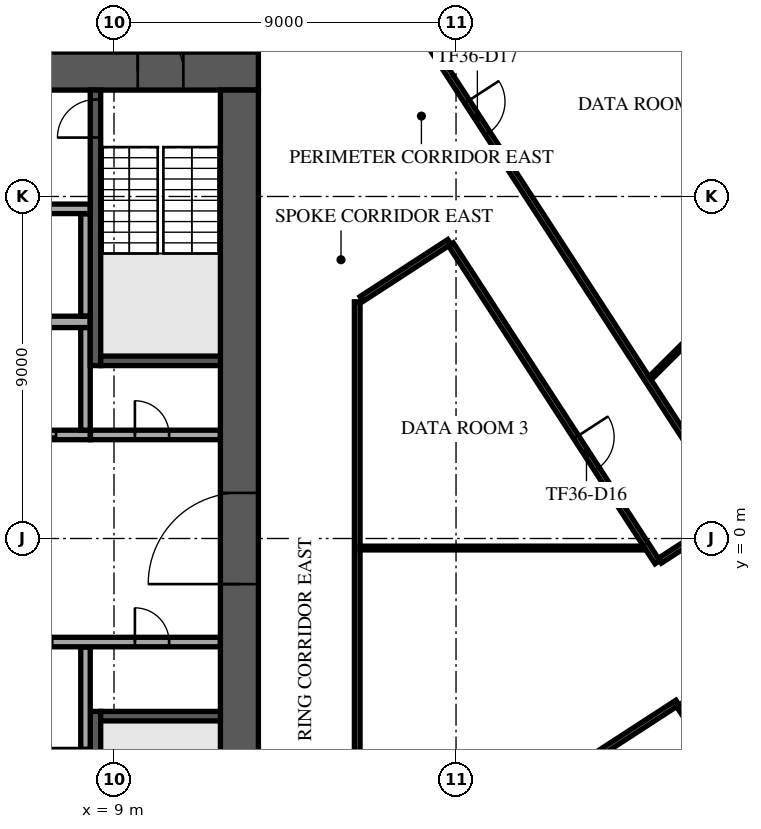
"""IFC4 building model, lengths in metres.
Left out: names, types, materials, properties, quantities, classifications, styles, units other than length and angle.
Written with IfcOpenShell. Run it as: python <this file> out.ifc"""

import sys

from ifc_helpers import new_model, si_unit, direction, frame, frame_2d, origin, place, context, subcontext, project, spatial, rectangle, extrude, element, fill, save


model = new_model("IFC4")
c1 = context("Model", 3, precision=1e-05, world=origin(), true_north=direction((0.0, 1.0)))
c2 = subcontext(c1, "Body", "Model", "MODEL_VIEW")
j1 = project(units=[si_unit("LENGTHUNIT", "METRE"), si_unit("PLANEANGLEUNIT", "RADIAN")], contexts=[c1])
p1 = place(None, origin())
s1 = spatial("IfcSite", under=j1, at=p1, CompositionType="ELEMENT")
p2 = place(p1, origin())
s2 = spatial("IfcBuilding", under=s1, at=p2, CompositionType="ELEMENT")
p3 = place(p2, frame((0.0, 0.0, 155.7)))
s3 = spatial("IfcBuildingStorey", under=s2, at=p3, CompositionType="ELEMENT", Elevation=155.7)
p4 = place(p3, frame((-12.8, 12.3, 0.0), z_axis=(0.0, 0.0, 1.0), x_axis=(1.0, 0.0, 0.0)))
e1 = element("IfcWall", 1, at=p4, inside=s3, PredefinedType="SHEAR", context=c2, shape_type="SweptSolid", body=[
    extrude(rectangle(XDim=25.6, YDim=1.0, at=frame_2d((12.8, 0.0))), origin(), (0.0, 0.0, 1.0), 3.6),
])
p5 = place(p4, frame((11.6, 0.0, 0.0)))
e2 = element("IfcOpeningElement", 2, at=p5, cuts=e1, PredefinedType="OPENING", context=c2, shape_type="SweptSolid", body=[
    extrude(rectangle(XDim=2.4, YDim=2.4, at=frame_2d((1.2, 1.2))), frame((0.0, 0.51, 0.0), z_axis=(0.0, -1.0, 0.0), x_axis=(1.0, 0.0, 0.0)), (0.0, 0.0, 1.0), 1.02),
])
p6 = place(p4, frame((22.425, 0.0, 0.0)))
e3 = element("IfcOpeningElement", 3, at=p6, cuts=e1, PredefinedType="OPENING", context=c2, shape_type="SweptSolid", body=[
    extrude(rectangle(XDim=1.2, YDim=2.1, at=frame_2d((0.6, 1.05))), frame((0.0, 0.51, 0.0), z_axis=(0.0, -1.0, 0.0), x_axis=(1.0, 0.0, 0.0)), (0.0, 0.0, 1.0), 1.02),
])
p7 = place(p4, frame((1.4, 0.0, 0.0)))
e4 = element("IfcOpeningElement", 4, at=p7, cuts=e1, PredefinedType="OPENING", context=c2, shape_type="SweptSolid", body=[
    extrude(rectangle(XDim=1.0, YDim=2.1, at=frame_2d((0.5, 1.05))), frame((0.0, 0.51, 0.0), z_axis=(0.0, -1.0, 0.0), x_axis=(1.0, 0.0, 0.0)), (0.0, 0.0, 1.0), 1.02),
])
p8 = place(p3, frame((12.3, -11.8, 0.0), z_axis=(0.0, 0.0, 1.0), x_axis=(0.0, 1.0, 0.0)))
e5 = element("IfcWall", 5, at=p8, inside=s3, PredefinedType="SHEAR", context=c2, shape_type="SweptSolid", body=[
    extrude(rectangle(XDim=23.6, YDim=1.0, at=frame_2d((11.8, 0.0))), origin(), (0.0, 0.0, 1.0), 3.6),
])
p9 = place(p8, frame((10.6, 0.0, 0.0)))
e6 = element("IfcOpeningElement", 6, at=p9, cuts=e5, PredefinedType="OPENING", context=c2, shape_type="SweptSolid", body=[
    extrude(rectangle(XDim=2.4, YDim=2.4, at=frame_2d((1.2, 1.2))), frame((0.0, 0.51, 0.0), z_axis=(0.0, -1.0, 0.0), x_axis=(1.0, 0.0, 0.0)), (0.0, 0.0, 1.0), 1.02),
])
p10 = place(p3, frame((-8.375, 5.7, 0.0), z_axis=(0.0, 0.0, 1.0), x_axis=(1.0, 0.0, 0.0)))
e7 = element("IfcWall", 7, at=p10, inside=s3, PredefinedType="SOLIDWALL", context=c2, shape_type="SweptSolid", body=[
    extrude(rectangle(XDim=16.75, YDim=0.3, at=frame_2d((8.375, 0.0))), origin(), (0.0, 0.0, 1.0), 3.6),
])
p11 = place(p3, frame((-2.875, -5.7, 0.0), z_axis=(0.0, 0.0, 1.0), x_axis=(1.0, 0.0, 0.0)))
e8 = element("IfcWall", 8, at=p11, inside=s3, PredefinedType="SOLIDWALL", context=c2, shape_type="SweptSolid", body=[
    extrude(rectangle(XDim=11.25, YDim=0.3, at=frame_2d((5.625, 0.0))), origin(), (0.0, 0.0, 1.0), 3.6),
])
p12 = place(p3, frame((-8.375, 2.725, 0.0), z_axis=(0.0, 0.0, 1.0), x_axis=(1.0, 0.0, 0.0)))
e9 = element("IfcWall", 9, at=p12, inside=s3, PredefinedType="SOLIDWALL", context=c2, shape_type="SweptSolid", body=[
    extrude(rectangle(XDim=16.75, YDim=0.25, at=frame_2d((8.375, 0.0))), origin(), (0.0, 0.0, 1.0), 3.6),
])
p13 = place(p12, frame((0.9, 0.0, 0.0)))
e10 = element("IfcOpeningElement", 10, at=p13, cuts=e9, PredefinedType="OPENING", context=c2, shape_type="SweptSolid", body=[
    extrude(rectangle(XDim=1.2, YDim=2.1, at=frame_2d((0.6, 1.05))), frame((0.0, 0.135, 0.0), z_axis=(0.0, -1.0, 0.0), x_axis=(1.0, 0.0, 0.0)), (0.0, 0.0, 1.0), 0.27),
])
p14 = place(p12, frame((3.65, 0.0, 0.0)))
e11 = element("IfcOpeningElement", 11, at=p14, cuts=e9, PredefinedType="OPENING", context=c2, shape_type="SweptSolid", body=[
    extrude(rectangle(XDim=1.2, YDim=2.1, at=frame_2d((0.6, 1.05))), frame((0.0, 0.135, 0.0), z_axis=(0.0, -1.0, 0.0), x_axis=(1.0, 0.0, 0.0)), (0.0, 0.0, 1.0), 0.27),
])
p15 = place(p12, frame((6.4, 0.0, 0.0)))
e12 = element("IfcOpeningElement", 12, at=p15, cuts=e9, PredefinedType="OPENING", context=c2, shape_type="SweptSolid", body=[
    extrude(rectangle(XDim=1.2, YDim=2.1, at=frame_2d((0.6, 1.05))), frame((0.0, 0.135, 0.0), z_axis=(0.0, -1.0, 0.0), x_axis=(1.0, 0.0, 0.0)), (0.0, 0.0, 1.0), 0.27),
])
p16 = place(p12, frame((9.15, 0.0, 0.0)))
e13 = element("IfcOpeningElement", 13, at=p16, cuts=e9, PredefinedType="OPENING", context=c2, shape_type="SweptSolid", body=[
    extrude(rectangle(XDim=1.2, YDim=2.1, at=frame_2d((0.6, 1.05))), frame((0.0, 0.135, 0.0), z_axis=(0.0, -1.0, 0.0), x_axis=(1.0, 0.0, 0.0)), (0.0, 0.0, 1.0), 0.27),
])
p17 = place(p12, frame((11.9, 0.0, 0.0)))
e14 = element("IfcOpeningElement", 14, at=p17, cuts=e9, PredefinedType="OPENING", context=c2, shape_type="SweptSolid", body=[
    extrude(rectangle(XDim=1.2, YDim=2.1, at=frame_2d((0.6, 1.05))), frame((0.0, 0.135, 0.0), z_axis=(0.0, -1.0, 0.0), x_axis=(1.0, 0.0, 0.0)), (0.0, 0.0, 1.0), 0.27),
])
p18 = place(p12, frame((14.65, 0.0, 0.0)))
e15 = element("IfcOpeningElement", 15, at=p18, cuts=e9, PredefinedType="OPENING", context=c2, shape_type="SweptSolid", body=[
    extrude(rectangle(XDim=1.2, YDim=2.1, at=frame_2d((0.6, 1.05))), frame((0.0, 0.135, 0.0), z_axis=(0.0, -1.0, 0.0), x_axis=(1.0, 0.0, 0.0)), (0.0, 0.0, 1.0), 0.27),
])
p19 = place(p3, frame((8.25, 2.85, 0.0), z_axis=(0.0, 0.0, 1.0), x_axis=(0.0, 1.0, 0.0)))
e16 = element("IfcWall", 16, at=p19, inside=s3, PredefinedType="SOLIDWALL", context=c2, shape_type="SweptSolid", body=[
    extrude(rectangle(XDim=2.7, YDim=0.25, at=frame_2d((1.35, 0.0))), origin(), (0.0, 0.0, 1.0), 3.6),
])
p20 = place(p3, frame((8.512, 4.55, 0.0), z_axis=(0.0, 0.0, 1.0), x_axis=(0.0, 1.0, 0.0)))
e17 = element("IfcWall", 17, at=p20, inside=s3, PredefinedType="SOLIDWALL", context=c2, shape_type="SweptSolid", body=[
    extrude(rectangle(XDim=7.25, YDim=0.275, at=frame_2d((3.625, 0.0))), origin(), (0.0, 0.0, 1.0), 3.6),
])
p21 = place(p20, frame((6.0, 0.0, 0.0)))
e18 = element("IfcOpeningElement", 18, at=p21, cuts=e17, PredefinedType="OPENING", context=c2, shape_type="SweptSolid", body=[
    extrude(rectangle(XDim=1.0, YDim=2.1, at=frame_2d((0.5, 1.05))), frame((0.0, 0.147, 0.0), z_axis=(0.0, -1.0, 0.0), x_axis=(1.0, 0.0, 0.0)), (0.0, 0.0, 1.0), 0.295),
])
p22 = place(p3, frame((8.65, 4.675, 0.0), z_axis=(0.0, 0.0, 1.0), x_axis=(1.0, 0.0, 0.0)))
e19 = element("IfcWall", 19, at=p22, inside=s3, PredefinedType="SOLIDWALL", context=c2, shape_type="SweptSolid", body=[
    extrude(rectangle(XDim=3.15, YDim=0.25, at=frame_2d((1.575, 0.0))), origin(), (0.0, 0.0, 1.0), 3.6),
])
p23 = place(p3, frame((8.512, -4.55, 0.0), z_axis=(0.0, 0.0, 1.0), x_axis=(0.0, -1.0, 0.0)))
e20 = element("IfcWall", 20, at=p23, inside=s3, PredefinedType="SOLIDWALL", context=c2, shape_type="SweptSolid", body=[
    extrude(rectangle(XDim=7.25, YDim=0.275, at=frame_2d((3.625, 0.0))), origin(), (0.0, 0.0, 1.0), 3.6),
])
p24 = place(p23, frame((6.0, 0.0, 0.0)))
e21 = element("IfcOpeningElement", 21, at=p24, cuts=e20, PredefinedType="OPENING", context=c2, shape_type="SweptSolid", body=[
    extrude(rectangle(XDim=1.0, YDim=2.1, at=frame_2d((0.5, 1.05))), frame((0.0, 0.147, 0.0), z_axis=(0.0, -1.0, 0.0), x_axis=(1.0, 0.0, 0.0)), (0.0, 0.0, 1.0), 0.295),
])
p25 = place(p3, frame((8.65, -4.675, 0.0), z_axis=(0.0, 0.0, 1.0), x_axis=(1.0, 0.0, 0.0)))
e22 = element("IfcWall", 22, at=p25, inside=s3, PredefinedType="SOLIDWALL", context=c2, shape_type="SweptSolid", body=[
    extrude(rectangle(XDim=3.15, YDim=0.25, at=frame_2d((1.575, 0.0))), origin(), (0.0, 0.0, 1.0), 3.6),
])
p26 = place(p3, frame((8.25, -5.545, 0.0), z_axis=(0.0, 0.0, 1.0), x_axis=(0.0, 1.0, 0.0)))
e23 = element("IfcWall", 23, at=p26, inside=s3, PredefinedType="PARTITIONING", context=c2, shape_type="SweptSolid", body=[
    extrude(rectangle(XDim=2.69, YDim=0.25, at=frame_2d((1.345, 0.0))), origin(), (0.0, 0.0, 1.0), 3.6),
])
p27 = place(p3, frame((5.63, -2.725, 0.0), z_axis=(0.0, 0.0, 1.0), x_axis=(1.0, 0.0, 0.0)))
e24 = element("IfcWall", 24, at=p27, inside=s3, PredefinedType="PARTITIONING", context=c2, shape_type="SweptSolid", body=[
    extrude(rectangle(XDim=6.165, YDim=0.25, at=frame_2d((3.083, 0.0))), origin(), (0.0, 0.0, 1.0), 3.6),
])
p28 = place(p27, frame((0.745, 0.0, 0.0)))
e25 = element("IfcOpeningElement", 25, at=p28, cuts=e24, PredefinedType="OPENING", context=c2, shape_type="SweptSolid", body=[
    extrude(rectangle(XDim=1.0, YDim=2.1, at=frame_2d((0.5, 1.05))), frame((0.0, 0.135, 0.0), z_axis=(0.0, -1.0, 0.0), x_axis=(1.0, 0.0, 0.0)), (0.0, 0.0, 1.0), 0.27),
])
p29 = place(p27, frame((3.92, 0.0, 0.0)))
e26 = element("IfcOpeningElement", 26, at=p29, cuts=e24, PredefinedType="OPENING", context=c2, shape_type="SweptSolid", body=[
    extrude(rectangle(XDim=0.9, YDim=2.1, at=frame_2d((0.45, 1.05))), frame((0.0, 0.135, 0.0), z_axis=(0.0, -1.0, 0.0), x_axis=(1.0, 0.0, 0.0)), (0.0, 0.0, 1.0), 0.27),
])
p30 = place(p3, frame((8.38, 2.725, 0.0), z_axis=(0.0, 0.0, 1.0), x_axis=(1.0, 0.0, 0.0)))
e27 = element("IfcWall", 27, at=p30, inside=s3, PredefinedType="PARTITIONING", context=c2, shape_type="SweptSolid", body=[
    extrude(rectangle(XDim=3.415, YDim=0.25, at=frame_2d((1.708, 0.0))), origin(), (0.0, 0.0, 1.0), 3.6),
])
p31 = place(p30, frame((1.17, 0.0, 0.0)))
e28 = element("IfcOpeningElement", 28, at=p31, cuts=e27, PredefinedType="OPENING", context=c2, shape_type="SweptSolid", body=[
    extrude(rectangle(XDim=0.9, YDim=2.1, at=frame_2d((0.45, 1.05))), frame((0.0, 0.135, 0.0), z_axis=(0.0, -1.0, 0.0), x_axis=(1.0, 0.0, 0.0)), (0.0, 0.0, 1.0), 0.27),
])
p32 = place(p3, frame((8.25, 5.855, 0.0), z_axis=(0.0, 0.0, 1.0), x_axis=(0.0, 1.0, 0.0)))
e29 = element("IfcWall", 29, at=p32, inside=s3, PredefinedType="PARTITIONING", context=c2, shape_type="SweptSolid", body=[
    extrude(rectangle(XDim=2.69, YDim=0.25, at=frame_2d((1.345, 0.0))), origin(), (0.0, 0.0, 1.0), 3.6),
])
p33 = place(p3, frame((-8.35, 8.675, 0.0), z_axis=(0.0, 0.0, 1.0), x_axis=(1.0, 0.0, 0.0)))
e30 = element("IfcWall", 30, at=p33, inside=s3, PredefinedType="PARTITIONING", context=c2, shape_type="SweptSolid", body=[
    extrude(rectangle(XDim=16.72, YDim=0.25, at=frame_2d((8.36, 0.0))), origin(), (0.0, 0.0, 1.0), 3.6),
])
p34 = place(p33, frame((0.975, 0.0, 0.0)))
e31 = element("IfcOpeningElement", 31, at=p34, cuts=e30, PredefinedType="OPENING", context=c2, shape_type="SweptSolid", body=[
    extrude(rectangle(XDim=1.0, YDim=2.1, at=frame_2d((0.5, 1.05))), frame((0.0, 0.135, 0.0), z_axis=(0.0, -1.0, 0.0), x_axis=(1.0, 0.0, 0.0)), (0.0, 0.0, 1.0), 0.27),
])
p35 = place(p33, frame((6.375, 0.0, 0.0)))
e32 = element("IfcOpeningElement", 32, at=p35, cuts=e30, PredefinedType="OPENING", context=c2, shape_type="SweptSolid", body=[
    extrude(rectangle(XDim=1.2, YDim=2.1, at=frame_2d((0.6, 1.05))), frame((0.0, 0.135, 0.0), z_axis=(0.0, -1.0, 0.0), x_axis=(1.0, 0.0, 0.0)), (0.0, 0.0, 1.0), 0.27),
])
p36 = place(p3, frame((36.496, -1.667, 0.0), z_axis=(0.0, 0.0, 1.0), x_axis=(-0.544637117646, 0.838671813096, 0.0)))
e33 = element("IfcWall", 33, at=p36, inside=s3, PredefinedType="STANDARD", context=c2, shape_type="SweptSolid", body=[
    extrude(rectangle(XDim=42.176, YDim=0.6, at=frame_2d((21.088, 0.0))), origin(), (0.0, 0.0, 1.0), 3.6),
])
p37 = place(p36, frame((1.138, 0.0, 0.9)))
e34 = element("IfcOpeningElement", 34, at=p37, cuts=e33, PredefinedType="OPENING", context=c2, shape_type="SweptSolid", body=[
    extrude(rectangle(XDim=2.3, YDim=2.1, at=frame_2d((1.15, 1.05))), frame((0.0, 0.31, 0.0), z_axis=(0.0, -1.0, 0.0), x_axis=(1.0, 0.0, 0.0)), (0.0, 0.0, 1.0), 0.62),
])
p38 = place(p36, frame((5.776, 0.0, 0.9)))
e35 = element("IfcOpeningElement", 35, at=p38, cuts=e33, PredefinedType="OPENING", context=c2, shape_type="SweptSolid", body=[
    extrude(rectangle(XDim=2.3, YDim=2.1, at=frame_2d((1.15, 1.05))), frame((0.0, 0.31, 0.0), z_axis=(0.0, -1.0, 0.0), x_axis=(1.0, 0.0, 0.0)), (0.0, 0.0, 1.0), 0.62),
])
p39 = place(p36, frame((10.476, 0.0, 0.9)))
e36 = element("IfcOpeningElement", 36, at=p39, cuts=e33, PredefinedType="OPENING", context=c2, shape_type="SweptSolid", body=[
    extrude(rectangle(XDim=2.3, YDim=2.1, at=frame_2d((1.15, 1.05))), frame((0.0, 0.31, 0.0), z_axis=(0.0, -1.0, 0.0), x_axis=(1.0, 0.0, 0.0)), (0.0, 0.0, 1.0), 0.62),
])
p40 = place(p36, frame((15.176, 0.0, 0.9)))
e37 = element("IfcOpeningElement", 37, at=p40, cuts=e33, PredefinedType="OPENING", context=c2, shape_type="SweptSolid", body=[
    extrude(rectangle(XDim=2.3, YDim=2.1, at=frame_2d((1.15, 1.05))), frame((0.0, 0.31, 0.0), z_axis=(0.0, -1.0, 0.0), x_axis=(1.0, 0.0, 0.0)), (0.0, 0.0, 1.0), 0.62),
])
p41 = place(p36, frame((19.876, 0.0, 0.9)))
e38 = element("IfcOpeningElement", 38, at=p41, cuts=e33, PredefinedType="OPENING", context=c2, shape_type="SweptSolid", body=[
    extrude(rectangle(XDim=2.3, YDim=2.1, at=frame_2d((1.15, 1.05))), frame((0.0, 0.31, 0.0), z_axis=(0.0, -1.0, 0.0), x_axis=(1.0, 0.0, 0.0)), (0.0, 0.0, 1.0), 0.62),
])
p42 = place(p36, frame((24.576, 0.0, 0.9)))
e39 = element("IfcOpeningElement", 39, at=p42, cuts=e33, PredefinedType="OPENING", context=c2, shape_type="SweptSolid", body=[
    extrude(rectangle(XDim=2.3, YDim=2.1, at=frame_2d((1.15, 1.05))), frame((0.0, 0.31, 0.0), z_axis=(0.0, -1.0, 0.0), x_axis=(1.0, 0.0, 0.0)), (0.0, 0.0, 1.0), 0.62),
])
p43 = place(p36, frame((29.276, 0.0, 0.9)))
e40 = element("IfcOpeningElement", 40, at=p43, cuts=e33, PredefinedType="OPENING", context=c2, shape_type="SweptSolid", body=[
    extrude(rectangle(XDim=2.3, YDim=2.1, at=frame_2d((1.15, 1.05))), frame((0.0, 0.31, 0.0), z_axis=(0.0, -1.0, 0.0), x_axis=(1.0, 0.0, 0.0)), (0.0, 0.0, 1.0), 0.62),
])
p44 = place(p36, frame((33.976, 0.0, 0.9)))
e41 = element("IfcOpeningElement", 41, at=p44, cuts=e33, PredefinedType="OPENING", context=c2, shape_type="SweptSolid", body=[
    extrude(rectangle(XDim=2.3, YDim=2.1, at=frame_2d((1.15, 1.05))), frame((0.0, 0.31, 0.0), z_axis=(0.0, -1.0, 0.0), x_axis=(1.0, 0.0, 0.0)), (0.0, 0.0, 1.0), 0.62),
])
p45 = place(p36, frame((38.676, 0.0, 0.9)))
e42 = element("IfcOpeningElement", 42, at=p45, cuts=e33, PredefinedType="OPENING", context=c2, shape_type="SweptSolid", body=[
    extrude(rectangle(XDim=2.3, YDim=2.1, at=frame_2d((1.15, 1.05))), frame((0.0, 0.31, 0.0), z_axis=(0.0, -1.0, 0.0), x_axis=(1.0, 0.0, 0.0)), (0.0, 0.0, 1.0), 0.62),
])
p46 = place(p3, frame((10.958, 22.783, 0.0), z_axis=(0.0, 0.0, 1.0), x_axis=(0.544655201926, -0.838660068809, 0.0)))
e43 = element("IfcWall", 43, at=p46, inside=s3, PredefinedType="PARTITIONING", context=c2, shape_type="SweptSolid", body=[
    extrude(rectangle(XDim=26.354, YDim=0.15, at=frame_2d((13.177, 0.0))), origin(), (0.0, 0.0, 1.0), 3.15),
])
p47 = place(p46, frame((13.46, 0.0, 0.0)))
e44 = element("IfcOpeningElement", 44, at=p47, cuts=e43, PredefinedType="OPENING", context=c2, shape_type="SweptSolid", body=[
    extrude(rectangle(XDim=1.0, YDim=2.1, at=frame_2d((0.5, 1.05))), frame((0.0, 0.085, 0.0), z_axis=(0.0, -1.0, 0.0), x_axis=(1.0, 0.0, 0.0)), (0.0, 0.0, 1.0), 0.17),
])
p48 = place(p3, frame((15.4, -9.791, 0.0), z_axis=(0.0, 0.0, 1.0), x_axis=(0.838699444503, 0.544594566435, 0.0)))
e45 = element("IfcWall", 45, at=p48, inside=s3, PredefinedType="PARTITIONING", context=c2, shape_type="SweptSolid", body=[
    extrude(rectangle(XDim=10.048, YDim=0.15, at=frame_2d((5.024, 0.0))), origin(), (0.0, 0.0, 1.0), 3.15),
])
p49 = place(p48, frame((5.8, 0.0, 0.0)))
e46 = element("IfcOpeningElement", 46, at=p49, cuts=e45, PredefinedType="OPENING", context=c2, shape_type="SweptSolid", body=[
    extrude(rectangle(XDim=1.0, YDim=2.1, at=frame_2d((0.5, 1.05))), frame((0.0, 0.085, 0.0), z_axis=(0.0, -1.0, 0.0), x_axis=(1.0, 0.0, 0.0)), (0.0, 0.0, 1.0), 0.17),
])
p50 = place(p3, frame((15.4, -9.653, 0.0), z_axis=(0.0, 0.0, 1.0), x_axis=(0.0, 1.0, 0.0)))
e47 = element("IfcWall", 47, at=p50, inside=s3, PredefinedType="PARTITIONING", context=c2, shape_type="SweptSolid", body=[
    extrude(rectangle(XDim=15.882, YDim=0.15, at=frame_2d((7.941, 0.0))), origin(), (0.0, 0.0, 1.0), 3.15),
])
p51 = place(p50, frame((1.05, 0.0, 0.0)))
e48 = element("IfcOpeningElement", 48, at=p51, cuts=e47, PredefinedType="OPENING", context=c2, shape_type="SweptSolid", body=[
    extrude(rectangle(XDim=1.8, YDim=2.1, at=frame_2d((0.9, 1.05))), frame((0.0, 0.085, 0.0), z_axis=(0.0, -1.0, 0.0), x_axis=(1.0, 0.0, 0.0)), (0.0, 0.0, 1.0), 0.17),
])
p52 = place(p3, frame((15.516, 6.304, 0.0), z_axis=(0.0, 0.0, 1.0), x_axis=(0.838528716493, 0.544857404846, 0.0)))
e49 = element("IfcWall", 49, at=p52, inside=s3, PredefinedType="PARTITIONING", context=c2, shape_type="SweptSolid", body=[
    extrude(rectangle(XDim=2.753, YDim=0.15, at=frame_2d((1.376, 0.0))), origin(), (0.0, 0.0, 1.0), 3.6),
])
p53 = place(p3, frame((17.865, 7.741, 0.0), z_axis=(0.0, 0.0, 1.0), x_axis=(0.544664903491, -0.838653768193, 0.0)))
e50 = element("IfcWall", 50, at=p53, inside=s3, PredefinedType="PARTITIONING", context=c2, shape_type="SweptSolid", body=[
    extrude(rectangle(XDim=9.977, YDim=0.15, at=frame_2d((4.988, 0.0))), origin(), (0.0, 0.0, 1.0), 3.15),
])
p54 = place(p53, frame((6.05, 0.0, 0.0)))
e51 = element("IfcOpeningElement", 51, at=p54, cuts=e50, PredefinedType="OPENING", context=c2, shape_type="SweptSolid", body=[
    extrude(rectangle(XDim=1.0, YDim=2.1, at=frame_2d((0.5, 1.05))), frame((0.0, 0.085, 0.0), z_axis=(0.0, -1.0, 0.0), x_axis=(1.0, 0.0, 0.0)), (0.0, 0.0, 1.0), 0.17),
])
p55 = place(p3, frame((23.362, -0.585, 0.0), z_axis=(0.0, 0.0, 1.0), x_axis=(0.83871619513, 0.544568768869, 0.0)))
e52 = element("IfcWall", 52, at=p55, inside=s3, PredefinedType="PARTITIONING", context=c2, shape_type="SweptSolid", body=[
    extrude(rectangle(XDim=2.25, YDim=0.15, at=frame_2d((1.125, 0.0))), origin(), (0.0, 0.0, 1.0), 3.15),
])
p56 = place(p3, frame((23.868, -4.382, 0.0), z_axis=(0.0, 0.0, 1.0), x_axis=(0.544690717141, -0.838637002916, 0.0)))
e53 = element("IfcWall", 53, at=p56, inside=s3, PredefinedType="PARTITIONING", context=c2, shape_type="SweptSolid", body=[
    extrude(rectangle(XDim=2.249, YDim=0.15, at=frame_2d((1.125, 0.0))), origin(), (0.0, 0.0, 1.0), 3.15),
])
p57 = place(p3, frame((15.475, -0.251, 0.0), z_axis=(0.0, 0.0, 1.0), x_axis=(1.0, 0.0, 0.0)))
e54 = element("IfcWall", 54, at=p57, inside=s3, PredefinedType="PARTITIONING", context=c2, shape_type="SweptSolid", body=[
    extrude(rectangle(XDim=7.458, YDim=0.1, at=frame_2d((3.729, 0.0))), origin(), (0.0, 0.0, 1.0), 3.6),
])
p58 = place(p3, frame((23.113, 4.223, 0.0), z_axis=(0.0, 0.0, 1.0), x_axis=(0.708669203066, 0.705540899329, 0.0)))
e55 = element("IfcWall", 55, at=p58, inside=s3, PredefinedType="PARTITIONING", context=c2, shape_type="SweptSolid", body=[
    extrude(rectangle(XDim=7.882, YDim=0.1, at=frame_2d((3.941, 0.0))), origin(), (0.0, 0.0, 1.0), 2.9),
])
p59 = place(p6, origin())
e56 = element("IfcDoor", 56, at=p59, inside=s3, OperationType="SINGLE_SWING_LEFT", PredefinedType="DOOR", context=c2, shape_type="SweptSolid", body=[
    extrude(rectangle(XDim=1.2, YDim=2.1, at=frame_2d((0.6, 1.05))), frame((0.0, 0.025, 0.0), z_axis=(0.0, -1.0, 0.0), x_axis=(1.0, 0.0, 0.0)), (0.0, 0.0, 1.0), 0.05),
])
fill(e3, e56)
p60 = place(p9, origin())
e57 = element("IfcDoor", 57, at=p60, inside=s3, OperationType="SINGLE_SWING_LEFT", PredefinedType="DOOR", context=c2, shape_type="SweptSolid", body=[
    extrude(rectangle(XDim=2.4, YDim=2.4, at=frame_2d((1.2, 1.2))), frame((0.0, 0.025, 0.0), z_axis=(0.0, -1.0, 0.0), x_axis=(1.0, 0.0, 0.0)), (0.0, 0.0, 1.0), 0.05),
])
fill(e6, e57)
p61 = place(p18, origin())
e58 = element("IfcDoor", 58, at=p61, inside=s3, OperationType="DOUBLE_DOOR_SLIDING", PredefinedType="DOOR", context=c2, shape_type="SweptSolid", body=[
    extrude(rectangle(XDim=1.2, YDim=2.1, at=frame_2d((0.6, 1.05))), frame((0.0, 0.025, 0.0), z_axis=(0.0, -1.0, 0.0), x_axis=(1.0, 0.0, 0.0)), (0.0, 0.0, 1.0), 0.05),
])
fill(e15, e58)
p62 = place(p21, origin())
e59 = element("IfcDoor", 59, at=p62, inside=s3, OperationType="SINGLE_SWING_LEFT", PredefinedType="DOOR", context=c2, shape_type="SweptSolid", body=[
    extrude(rectangle(XDim=1.0, YDim=2.1, at=frame_2d((0.5, 1.05))), frame((0.0, 0.025, 0.0), z_axis=(0.0, -1.0, 0.0), x_axis=(1.0, 0.0, 0.0)), (0.0, 0.0, 1.0), 0.05),
])
fill(e18, e59)
p63 = place(p31, origin())
e60 = element("IfcDoor", 60, at=p63, inside=s3, OperationType="SINGLE_SWING_LEFT", PredefinedType="DOOR", context=c2, shape_type="SweptSolid", body=[
    extrude(rectangle(XDim=0.9, YDim=2.1, at=frame_2d((0.45, 1.05))), frame((0.0, 0.025, 0.0), z_axis=(0.0, -1.0, 0.0), x_axis=(1.0, 0.0, 0.0)), (0.0, 0.0, 1.0), 0.05),
])
fill(e28, e60)
p64 = place(p29, origin())
e61 = element("IfcDoor", 61, at=p64, inside=s3, OperationType="SINGLE_SWING_LEFT", PredefinedType="DOOR", context=c2, shape_type="SweptSolid", body=[
    extrude(rectangle(XDim=0.9, YDim=2.1, at=frame_2d((0.45, 1.05))), frame((0.0, 0.025, 0.0), z_axis=(0.0, -1.0, 0.0), x_axis=(1.0, 0.0, 0.0)), (0.0, 0.0, 1.0), 0.05),
])
fill(e26, e61)
p65 = place(p54, frame((1.0, 0.0, 0.0), z_axis=(0.0, 0.0, 1.0), x_axis=(-1.0, 0.0, 0.0)))
e62 = element("IfcDoor", 62, at=p65, inside=s3, OperationType="SINGLE_SWING_RIGHT", PredefinedType="DOOR", context=c2, shape_type="SweptSolid", body=[
    extrude(rectangle(XDim=1.0, YDim=2.1, at=frame_2d((0.5, 1.05))), frame((0.0, 0.025, 0.0), z_axis=(0.0, -1.0, 0.0), x_axis=(1.0, 0.0, 0.0)), (0.0, 0.0, 1.0), 0.05),
])
fill(e51, e62)
p66 = place(p47, origin())
e63 = element("IfcDoor", 63, at=p66, inside=s3, OperationType="SINGLE_SWING_RIGHT", PredefinedType="DOOR", context=c2, shape_type="SweptSolid", body=[
    extrude(rectangle(XDim=1.0, YDim=2.1, at=frame_2d((0.5, 1.05))), frame((0.0, 0.025, 0.0), z_axis=(0.0, -1.0, 0.0), x_axis=(1.0, 0.0, 0.0)), (0.0, 0.0, 1.0), 0.05),
])
fill(e44, e63)
save(model, sys.argv[1])
